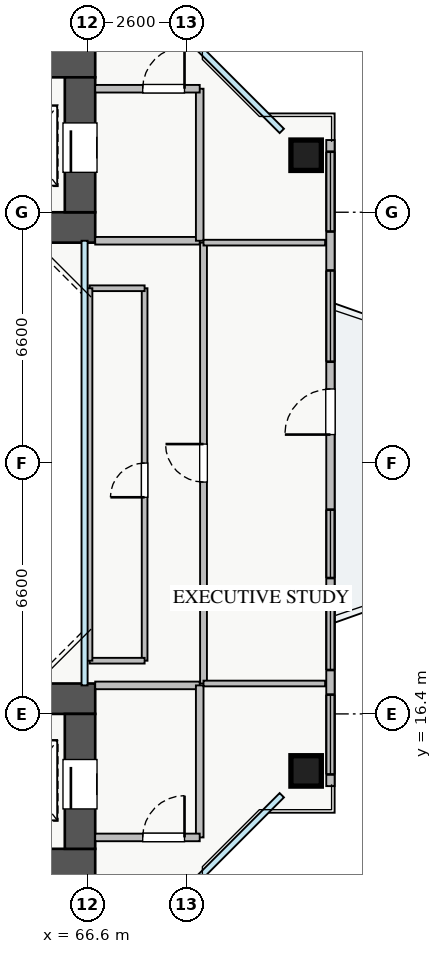
"""IFC4 building model, lengths in metres.
Left out: names, types, materials, properties, quantities, classifications, styles, units other than length and angle.
Written with IfcOpenShell. Run it as: python <this file> out.ifc"""

import sys

from ifc_helpers import new_model, si_unit, direction, frame, frame_2d, origin, origin_2d, place, context, subcontext, project, spatial, rectangle, extrude, source, transform, mapped, element, fill, save


model = new_model("IFC4")
c1 = context("Model", 3, precision=1e-05, world=origin(), true_north=direction((0.0, 1.0)))
c2 = subcontext(c1, "Body", "Model", "MODEL_VIEW")
j1 = project(units=[si_unit("LENGTHUNIT", "METRE"), si_unit("PLANEANGLEUNIT", "RADIAN")], contexts=[c1])
p1 = place(None, origin())
s1 = spatial("IfcSite", under=j1, at=p1, CompositionType="ELEMENT")
p2 = place(p1, origin())
s2 = spatial("IfcBuilding", under=s1, at=p2, CompositionType="ELEMENT")
p3 = place(p2, frame((0.0, 0.0, 76.25)))
s3 = spatial("IfcBuildingStorey", under=s2, at=p3, CompositionType="ELEMENT", Elevation=76.25)
p4 = place(p3, frame((54.2, 29.2, 0.0), z_axis=(0.0, 0.0, 1.0), x_axis=(1.0, 0.0, 0.0)))
e1 = element("IfcWall", 1, at=p4, inside=s3, PredefinedType="SHEAR", context=c2, shape_type="SweptSolid", body=[
    extrude(rectangle(XDim=12.6, YDim=0.8, at=frame_2d((6.3, 0.0))), origin(), (0.0, 0.0, 1.0), 3.25),
])
p5 = place(p3, frame((54.2, 33.55, 0.0), z_axis=(0.0, 0.0, 1.0), x_axis=(1.0, 0.0, 0.0)))
e2 = element("IfcWall", 2, at=p5, inside=s3, PredefinedType="SHEAR", context=c2, shape_type="SweptSolid", body=[
    extrude(rectangle(XDim=12.6, YDim=0.8, at=frame_2d((6.3, 0.0))), origin(), (0.0, 0.0, 1.0), 3.25),
])
p6 = place(p5, frame((8.2, 0.0, 0.0)))
e3 = element("IfcOpeningElement", 3, at=p6, cuts=e2, PredefinedType="OPENING", context=c2, shape_type="SweptSolid", body=[
    extrude(rectangle(XDim=1.1, YDim=2.05, at=frame_2d((0.55, 1.025))), frame((0.0, 0.41, 0.0), z_axis=(0.0, -1.0, 0.0), x_axis=(1.0, 0.0, 0.0)), (0.0, 0.0, 1.0), 0.82),
])
p7 = place(p3, frame((66.4, 29.6, 0.0), z_axis=(0.0, 0.0, 1.0), x_axis=(0.0, 1.0, 0.0)))
e4 = element("IfcWall", 4, at=p7, inside=s3, PredefinedType="SHEAR", context=c2, shape_type="SweptSolid", body=[
    extrude(rectangle(XDim=3.55, YDim=0.8, at=frame_2d((1.775, 0.0))), origin(), (0.0, 0.0, 1.0), 3.25),
])
p8 = place(p7, frame((1.05, 0.0, 0.0)))
e5 = element("IfcOpeningElement", 5, at=p8, cuts=e4, PredefinedType="OPENING", context=c2, shape_type="SweptSolid", body=[
    extrude(rectangle(XDim=1.3, YDim=2.05, at=frame_2d((0.65, 1.025))), frame((0.0, 0.41, 0.0), z_axis=(0.0, -1.0, 0.0), x_axis=(1.0, 0.0, 0.0)), (0.0, 0.0, 1.0), 0.82),
])
p9 = place(p3, frame((54.2, 12.45, 0.0), z_axis=(0.0, 0.0, 1.0), x_axis=(1.0, 0.0, 0.0)))
e6 = element("IfcWall", 6, at=p9, inside=s3, PredefinedType="SHEAR", context=c2, shape_type="SweptSolid", body=[
    extrude(rectangle(XDim=12.6, YDim=0.8, at=frame_2d((6.3, 0.0))), origin(), (0.0, 0.0, 1.0), 3.25),
])
p10 = place(p9, frame((8.2, 0.0, 0.0)))
e7 = element("IfcOpeningElement", 7, at=p10, cuts=e6, PredefinedType="OPENING", context=c2, shape_type="SweptSolid", body=[
    extrude(rectangle(XDim=1.1, YDim=2.05, at=frame_2d((0.55, 1.025))), frame((0.0, 0.41, 0.0), z_axis=(0.0, -1.0, 0.0), x_axis=(1.0, 0.0, 0.0)), (0.0, 0.0, 1.0), 0.82),
])
p11 = place(p3, frame((54.2, 16.8, 0.0), z_axis=(0.0, 0.0, 1.0), x_axis=(1.0, 0.0, 0.0)))
e8 = element("IfcWall", 8, at=p11, inside=s3, PredefinedType="SHEAR", context=c2, shape_type="SweptSolid", body=[
    extrude(rectangle(XDim=12.6, YDim=0.8, at=frame_2d((6.3, 0.0))), origin(), (0.0, 0.0, 1.0), 3.25),
])
p12 = place(p3, frame((66.4, 12.85, 0.0), z_axis=(0.0, 0.0, 1.0), x_axis=(0.0, 1.0, 0.0)))
e9 = element("IfcWall", 9, at=p12, inside=s3, PredefinedType="SHEAR", context=c2, shape_type="SweptSolid", body=[
    extrude(rectangle(XDim=3.55, YDim=0.8, at=frame_2d((1.775, 0.0))), origin(), (0.0, 0.0, 1.0), 3.25),
])
p13 = place(p12, frame((1.05, 0.0, 0.0)))
e10 = element("IfcOpeningElement", 10, at=p13, cuts=e9, PredefinedType="OPENING", context=c2, shape_type="SweptSolid", body=[
    extrude(rectangle(XDim=1.3, YDim=2.05, at=frame_2d((0.65, 1.025))), frame((0.0, 0.41, 0.0), z_axis=(0.0, -1.0, 0.0), x_axis=(1.0, 0.0, 0.0)), (0.0, 0.0, 1.0), 0.82),
])
m1 = source(origin(), c2, "Body", "SweptSolid", [
    extrude(rectangle(XDim=0.8, YDim=0.8, at=origin_2d()), origin(), (0.0, 0.0, 1.0), 3.25),
])
for number, where, z_axis, x_axis in (
    (11, (72.35, 14.9, 0.0), (0.0, 0.0, 1.0), (1.0, 0.0, 0.0)),
    (12, (72.35, 31.1, 0.0), (0.0, 0.0, 1.0), (1.0, 0.0, 0.0)),
):
    element("IfcColumn", number, at=place(p3, frame(where, z_axis=z_axis, x_axis=x_axis)), inside=s3, PredefinedType="COLUMN", context=c2, shape_type="MappedRepresentation", body=[
        mapped(m1, transform((0.0, 0.0, 0.0), x_axis=(1.0, 0.0, 0.0), y_axis=(0.0, 1.0, 0.0), z_axis=(0.0, 0.0, 1.0), scale=1.0)),
    ])
p14 = place(p3, frame((72.99, 14.5, 0.0), z_axis=(0.0, 0.0, 1.0), x_axis=(0.0, 1.0, 0.0)))
e13 = element("IfcWall", 13, at=p14, inside=s3, PredefinedType="STANDARD", context=c2, shape_type="SweptSolid", body=[
    extrude(rectangle(XDim=17.0, YDim=0.22, at=frame_2d((8.5, 0.0))), origin(), (0.0, 0.0, 1.0), 2.61),
])
p15 = place(p14, frame((9.25, 0.0, 0.0)))
e14 = element("IfcOpeningElement", 14, at=p15, cuts=e13, PredefinedType="OPENING", context=c2, shape_type="SweptSolid", body=[
    extrude(rectangle(XDim=1.2, YDim=2.1, at=frame_2d((0.6, 1.05))), frame((0.0, 0.12, 0.0), z_axis=(0.0, -1.0, 0.0), x_axis=(1.0, 0.0, 0.0)), (0.0, 0.0, 1.0), 0.24),
])
p16 = place(p14, frame((0.308, 0.0, 0.9)))
e15 = element("IfcOpeningElement", 15, at=p16, cuts=e13, PredefinedType="OPENING", context=c2, shape_type="SweptSolid", body=[
    extrude(rectangle(XDim=2.1, YDim=1.5, at=frame_2d((1.05, 0.75))), frame((0.0, 0.12, 0.0), z_axis=(0.0, -1.0, 0.0), x_axis=(1.0, 0.0, 0.0)), (0.0, 0.0, 1.0), 0.24),
])
p17 = place(p14, frame((5.475, 0.0, 0.9)))
e16 = element("IfcOpeningElement", 16, at=p17, cuts=e13, PredefinedType="OPENING", context=c2, shape_type="SweptSolid", body=[
    extrude(rectangle(XDim=1.8, YDim=1.45, at=frame_2d((0.9, 0.725))), frame((0.0, 0.12, 0.0), z_axis=(0.0, -1.0, 0.0), x_axis=(1.0, 0.0, 0.0)), (0.0, 0.0, 1.0), 0.24),
])
p18 = place(p14, frame((14.593, 0.0, 0.9)))
e17 = element("IfcOpeningElement", 17, at=p18, cuts=e13, PredefinedType="OPENING", context=c2, shape_type="SweptSolid", body=[
    extrude(rectangle(XDim=2.1, YDim=1.5, at=frame_2d((1.05, 0.75))), frame((0.0, 0.12, 0.0), z_axis=(0.0, -1.0, 0.0), x_axis=(1.0, 0.0, 0.0)), (0.0, 0.0, 1.0), 0.24),
])
p19 = place(p14, frame((3.055, 0.0, 0.9)))
e18 = element("IfcOpeningElement", 18, at=p19, cuts=e13, PredefinedType="OPENING", context=c2, shape_type="SweptSolid", body=[
    extrude(rectangle(XDim=2.1, YDim=1.5, at=frame_2d((1.05, 0.75))), frame((0.0, 0.12, 0.0), z_axis=(0.0, -1.0, 0.0), x_axis=(1.0, 0.0, 0.0)), (0.0, 0.0, 1.0), 0.24),
])
p20 = place(p14, frame((11.167, 0.0, 0.9)))
e19 = element("IfcOpeningElement", 19, at=p20, cuts=e13, PredefinedType="OPENING", context=c2, shape_type="SweptSolid", body=[
    extrude(rectangle(XDim=2.4, YDim=1.5, at=frame_2d((1.2, 0.75))), frame((0.0, 0.12, 0.0), z_axis=(0.0, -1.0, 0.0), x_axis=(1.0, 0.0, 0.0)), (0.0, 0.0, 1.0), 0.24),
])
p21 = place(p3, frame((66.8, 28.85, 0.0), z_axis=(0.0, 0.0, 1.0), x_axis=(1.0, 0.0, 0.0)))
e20 = element("IfcWall", 20, at=p21, inside=s3, PredefinedType="PARTITIONING", context=c2, shape_type="SweptSolid", body=[
    extrude(rectangle(XDim=2.75, YDim=0.2, at=frame_2d((1.375, 0.0))), origin(), (0.0, 0.0, 1.0), 3.07),
])
p22 = place(p3, frame((69.55, 28.85, 0.0), z_axis=(0.0, 0.0, 1.0), x_axis=(0.0, 1.0, 0.0)))
e21 = element("IfcWall", 21, at=p22, inside=s3, PredefinedType="PARTITIONING", context=c2, shape_type="SweptSolid", body=[
    extrude(rectangle(XDim=4.0, YDim=0.2, at=frame_2d((2.0, 0.0))), origin(), (0.0, 0.0, 1.0), 3.07),
])
p23 = place(p3, frame((66.8, 32.85, 0.0), z_axis=(0.0, 0.0, 1.0), x_axis=(1.0, 0.0, 0.0)))
e22 = element("IfcWall", 22, at=p23, inside=s3, PredefinedType="PARTITIONING", context=c2, shape_type="SweptSolid", body=[
    extrude(rectangle(XDim=2.75, YDim=0.2, at=frame_2d((1.375, 0.0))), origin(), (0.0, 0.0, 1.0), 3.07),
])
p24 = place(p23, frame((1.25, 0.0, 0.0)))
e23 = element("IfcOpeningElement", 23, at=p24, cuts=e22, PredefinedType="OPENING", context=c2, shape_type="SweptSolid", body=[
    extrude(rectangle(XDim=1.1, YDim=2.05, at=frame_2d((0.55, 1.025))), frame((0.0, 0.11, 0.0), z_axis=(0.0, -1.0, 0.0), x_axis=(1.0, 0.0, 0.0)), (0.0, 0.0, 1.0), 0.22),
])
p25 = place(p3, frame((66.8, 17.15, 0.0), z_axis=(0.0, 0.0, 1.0), x_axis=(1.0, 0.0, 0.0)))
e24 = element("IfcWall", 24, at=p25, inside=s3, PredefinedType="PARTITIONING", context=c2, shape_type="SweptSolid", body=[
    extrude(rectangle(XDim=2.75, YDim=0.2, at=frame_2d((1.375, 0.0))), origin(), (0.0, 0.0, 1.0), 3.07),
])
p26 = place(p3, frame((69.55, 13.15, 0.0), z_axis=(0.0, 0.0, 1.0), x_axis=(0.0, 1.0, 0.0)))
e25 = element("IfcWall", 25, at=p26, inside=s3, PredefinedType="PARTITIONING", context=c2, shape_type="SweptSolid", body=[
    extrude(rectangle(XDim=4.0, YDim=0.2, at=frame_2d((2.0, 0.0))), origin(), (0.0, 0.0, 1.0), 3.07),
])
p27 = place(p3, frame((66.8, 13.15, 0.0), z_axis=(0.0, 0.0, 1.0), x_axis=(1.0, 0.0, 0.0)))
e26 = element("IfcWall", 26, at=p27, inside=s3, PredefinedType="PARTITIONING", context=c2, shape_type="SweptSolid", body=[
    extrude(rectangle(XDim=2.75, YDim=0.2, at=frame_2d((1.375, 0.0))), origin(), (0.0, 0.0, 1.0), 3.07),
])
p28 = place(p27, frame((1.25, 0.0, 0.0)))
e27 = element("IfcOpeningElement", 27, at=p28, cuts=e26, PredefinedType="OPENING", context=c2, shape_type="SweptSolid", body=[
    extrude(rectangle(XDim=1.1, YDim=2.05, at=frame_2d((0.55, 1.025))), frame((0.0, 0.11, 0.0), z_axis=(0.0, -1.0, 0.0), x_axis=(1.0, 0.0, 0.0)), (0.0, 0.0, 1.0), 0.22),
])
p29 = place(p3, frame((69.65, 17.2, 0.0), z_axis=(0.0, 0.0, 1.0), x_axis=(0.0, 1.0, 0.0)))
e28 = element("IfcWall", 28, at=p29, inside=s3, PredefinedType="PARTITIONING", context=c2, shape_type="SweptSolid", body=[
    extrude(rectangle(XDim=11.6, YDim=0.18, at=frame_2d((5.8, 0.0))), origin(), (0.0, 0.0, 1.0), 3.07),
])
p30 = place(p29, frame((5.3, 0.0, 0.0)))
e29 = element("IfcOpeningElement", 29, at=p30, cuts=e28, PredefinedType="OPENING", context=c2, shape_type="SweptSolid", body=[
    extrude(rectangle(XDim=1.0, YDim=2.05, at=frame_2d((0.5, 1.025))), frame((0.0, 0.1, 0.0), z_axis=(0.0, -1.0, 0.0), x_axis=(1.0, 0.0, 0.0)), (0.0, 0.0, 1.0), 0.2),
])
for number, where, z_axis, x_axis in (
    (30, (69.65, 17.2, 0.0), (0.0, 0.0, 1.0), (1.0, 0.0, 0.0)),
    (31, (69.65, 28.8, 0.0), (0.0, 0.0, 1.0), (1.0, 0.0, 0.0)),
):
    element("IfcWall", number, at=place(p3, frame(where, z_axis=z_axis, x_axis=x_axis)), inside=s3, PredefinedType="PARTITIONING", context=c2, shape_type="SweptSolid", body=[
        extrude(rectangle(XDim=3.2, YDim=0.15, at=frame_2d((1.6, 0.0))), origin(), (0.0, 0.0, 1.0), 3.07),
    ])
p31 = place(p3, frame((68.1, 17.8, 0.0), z_axis=(0.0, 0.0, 1.0), x_axis=(0.0, 1.0, 0.0)))
e32 = element("IfcWall", 32, at=p31, inside=s3, PredefinedType="PARTITIONING", context=c2, shape_type="SweptSolid", body=[
    extrude(rectangle(XDim=9.8, YDim=0.15, at=frame_2d((4.9, 0.0))), origin(), (0.0, 0.0, 1.0), 3.07),
])
p32 = place(p31, frame((4.3, 0.0, 0.0)))
e33 = element("IfcOpeningElement", 33, at=p32, cuts=e32, PredefinedType="OPENING", context=c2, shape_type="SweptSolid", body=[
    extrude(rectangle(XDim=0.9, YDim=2.05, at=frame_2d((0.45, 1.025))), frame((0.0, 0.085, 0.0), z_axis=(0.0, -1.0, 0.0), x_axis=(1.0, 0.0, 0.0)), (0.0, 0.0, 1.0), 0.17),
])
p33 = place(p3, frame((66.65, 27.6, 0.0), z_axis=(0.0, 0.0, 1.0), x_axis=(1.0, 0.0, 0.0)))
e34 = element("IfcWall", 34, at=p33, inside=s3, PredefinedType="PARTITIONING", context=c2, shape_type="SweptSolid", body=[
    extrude(rectangle(XDim=1.45, YDim=0.15, at=frame_2d((0.725, 0.0))), origin(), (0.0, 0.0, 1.0), 2.715),
])
p34 = place(p3, frame((66.65, 17.8, 0.0), z_axis=(0.0, 0.0, 1.0), x_axis=(1.0, 0.0, 0.0)))
e35 = element("IfcWall", 35, at=p34, inside=s3, PredefinedType="PARTITIONING", context=c2, shape_type="SweptSolid", body=[
    extrude(rectangle(XDim=1.45, YDim=0.15, at=frame_2d((0.725, 0.0))), origin(), (0.0, 0.0, 1.0), 3.07),
])
p35 = place(p3, frame((66.65, 17.8, 0.0), z_axis=(0.0, 0.0, 1.0), x_axis=(0.0, 1.0, 0.0)))
e36 = element("IfcWall", 36, at=p35, inside=s3, PredefinedType="PARTITIONING", context=c2, shape_type="SweptSolid", body=[
    extrude(rectangle(XDim=9.8, YDim=0.15, at=frame_2d((4.9, 0.0))), origin(), (0.0, 0.0, 1.0), 2.665),
])
m2 = source(origin(), c2, "Body", "SweptSolid", [
    extrude(rectangle(XDim=1.2, YDim=2.1, at=frame_2d((0.6, 1.05))), frame((0.0, 0.025, 0.0), z_axis=(0.0, -1.0, 0.0), x_axis=(1.0, 0.0, 0.0)), (0.0, 0.0, 1.0), 0.05),
])
p36 = place(p15, origin())
e37 = element("IfcDoor", 37, at=p36, inside=s3, OperationType="SINGLE_SWING_LEFT", PredefinedType="DOOR", context=c2, shape_type="MappedRepresentation", body=[
    mapped(m2, transform((0.0, 0.0, 0.0), x_axis=(1.0, 0.0, 0.0), y_axis=(0.0, 1.0, 0.0), z_axis=(0.0, 0.0, 1.0), scale=1.0)),
])
fill(e14, e37)
m3 = source(origin(), c2, "Body", "SweptSolid", [
    extrude(rectangle(XDim=2.1, YDim=1.5, at=frame_2d((1.05, 0.75))), frame((0.0, 0.03, 0.0), z_axis=(0.0, -1.0, 0.0), x_axis=(1.0, 0.0, 0.0)), (0.0, 0.0, 1.0), 0.06),
])
p37 = place(p16, origin())
e38 = element("IfcWindow", 38, at=p37, inside=s3, PartitioningType="TRIPLE_PANEL_VERTICAL", PredefinedType="WINDOW", context=c2, shape_type="MappedRepresentation", body=[
    mapped(m3, transform((0.0, 0.0, 0.0), x_axis=(1.0, 0.0, 0.0), y_axis=(0.0, 1.0, 0.0), z_axis=(0.0, 0.0, 1.0), scale=1.0)),
])
fill(e15, e38)
m4 = source(origin(), c2, "Body", "SweptSolid", [
    extrude(rectangle(XDim=1.8, YDim=1.45, at=frame_2d((0.9, 0.725))), frame((0.0, 0.03, 0.0), z_axis=(0.0, -1.0, 0.0), x_axis=(1.0, 0.0, 0.0)), (0.0, 0.0, 1.0), 0.06),
])
p38 = place(p17, origin())
e39 = element("IfcWindow", 39, at=p38, inside=s3, PartitioningType="DOUBLE_PANEL_VERTICAL", PredefinedType="WINDOW", context=c2, shape_type="MappedRepresentation", body=[
    mapped(m4, transform((0.0, 0.0, 0.0), x_axis=(1.0, 0.0, 0.0), y_axis=(0.0, 1.0, 0.0), z_axis=(0.0, 0.0, 1.0), scale=1.0)),
])
fill(e16, e39)
p39 = place(p18, origin())
e40 = element("IfcWindow", 40, at=p39, inside=s3, PartitioningType="TRIPLE_PANEL_VERTICAL", PredefinedType="WINDOW", context=c2, shape_type="MappedRepresentation", body=[
    mapped(m3, transform((0.0, 0.0, 0.0), x_axis=(1.0, 0.0, 0.0), y_axis=(0.0, 1.0, 0.0), z_axis=(0.0, 0.0, 1.0), scale=1.0)),
])
fill(e17, e40)
m5 = source(origin(), c2, "Body", "SweptSolid", [
    extrude(rectangle(XDim=1.3, YDim=2.05, at=frame_2d((0.65, 1.025))), frame((0.0, 0.025, 0.0), z_axis=(0.0, -1.0, 0.0), x_axis=(1.0, 0.0, 0.0)), (0.0, 0.0, 1.0), 0.05),
])
p40 = place(p8, origin())
e41 = element("IfcDoor", 41, at=p40, inside=s3, OperationType="SLIDING_TO_LEFT", PredefinedType="DOOR", context=c2, shape_type="MappedRepresentation", body=[
    mapped(m5, transform((0.0, 0.0, 0.0), x_axis=(1.0, 0.0, 0.0), y_axis=(0.0, 1.0, 0.0), z_axis=(0.0, 0.0, 1.0), scale=1.0)),
])
fill(e5, e41)
p41 = place(p13, origin())
e42 = element("IfcDoor", 42, at=p41, inside=s3, OperationType="SLIDING_TO_RIGHT", PredefinedType="DOOR", context=c2, shape_type="MappedRepresentation", body=[
    mapped(m5, transform((0.0, 0.0, 0.0), x_axis=(1.0, 0.0, 0.0), y_axis=(0.0, 1.0, 0.0), z_axis=(0.0, 0.0, 1.0), scale=1.0)),
])
fill(e10, e42)
m6 = source(origin(), c2, "Body", "SweptSolid", [
    extrude(rectangle(XDim=1.1, YDim=2.05, at=frame_2d((0.55, 1.025))), frame((0.0, 0.025, 0.0), z_axis=(0.0, -1.0, 0.0), x_axis=(1.0, 0.0, 0.0)), (0.0, 0.0, 1.0), 0.05),
])
p42 = place(p24, origin())
e43 = element("IfcDoor", 43, at=p42, inside=s3, OperationType="SINGLE_SWING_RIGHT", PredefinedType="DOOR", context=c2, shape_type="MappedRepresentation", body=[
    mapped(m6, transform((0.0, 0.0, 0.0), x_axis=(1.0, 0.0, 0.0), y_axis=(0.0, 1.0, 0.0), z_axis=(0.0, 0.0, 1.0), scale=1.0)),
])
fill(e23, e43)
p43 = place(p28, origin())
e44 = element("IfcDoor", 44, at=p43, inside=s3, OperationType="SINGLE_SWING_RIGHT", PredefinedType="DOOR", context=c2, shape_type="MappedRepresentation", body=[
    mapped(m6, transform((0.0, 0.0, 0.0), x_axis=(1.0, 0.0, 0.0), y_axis=(0.0, 1.0, 0.0), z_axis=(0.0, 0.0, 1.0), scale=1.0)),
])
fill(e27, e44)
m7 = source(origin(), c2, "Body", "SweptSolid", [
    extrude(rectangle(XDim=1.0, YDim=2.05, at=frame_2d((0.5, 1.025))), frame((0.0, 0.025, 0.0), z_axis=(0.0, -1.0, 0.0), x_axis=(1.0, 0.0, 0.0)), (0.0, 0.0, 1.0), 0.05),
])
p44 = place(p30, origin())
e45 = element("IfcDoor", 45, at=p44, inside=s3, OperationType="SINGLE_SWING_RIGHT", PredefinedType="DOOR", context=c2, shape_type="MappedRepresentation", body=[
    mapped(m7, transform((0.0, 0.0, 0.0), x_axis=(1.0, 0.0, 0.0), y_axis=(0.0, 1.0, 0.0), z_axis=(0.0, 0.0, 1.0), scale=1.0)),
])
fill(e29, e45)
m8 = source(origin(), c2, "Body", "SweptSolid", [
    extrude(rectangle(XDim=0.9, YDim=2.05, at=frame_2d((0.45, 1.025))), frame((0.0, 0.025, 0.0), z_axis=(0.0, -1.0, 0.0), x_axis=(1.0, 0.0, 0.0)), (0.0, 0.0, 1.0), 0.05),
])
p45 = place(p32, origin())
e46 = element("IfcDoor", 46, at=p45, inside=s3, OperationType="SINGLE_SWING_LEFT", PredefinedType="DOOR", context=c2, shape_type="MappedRepresentation", body=[
    mapped(m8, transform((0.0, 0.0, 0.0), x_axis=(1.0, 0.0, 0.0), y_axis=(0.0, 1.0, 0.0), z_axis=(0.0, 0.0, 1.0), scale=1.0)),
])
fill(e33, e46)
p46 = place(p19, origin())
e47 = element("IfcWindow", 47, at=p46, inside=s3, PartitioningType="TRIPLE_PANEL_VERTICAL", PredefinedType="WINDOW", context=c2, shape_type="MappedRepresentation", body=[
    mapped(m3, transform((0.0, 0.0, 0.0), x_axis=(1.0, 0.0, 0.0), y_axis=(0.0, 1.0, 0.0), z_axis=(0.0, 0.0, 1.0), scale=1.0)),
])
fill(e18, e47)
m9 = source(origin(), c2, "Body", "SweptSolid", [
    extrude(rectangle(XDim=2.4, YDim=1.5, at=frame_2d((1.2, 0.75))), frame((0.0, 0.03, 0.0), z_axis=(0.0, -1.0, 0.0), x_axis=(1.0, 0.0, 0.0)), (0.0, 0.0, 1.0), 0.06),
])
p47 = place(p20, origin())
e48 = element("IfcWindow", 48, at=p47, inside=s3, PartitioningType="TRIPLE_PANEL_VERTICAL", PredefinedType="WINDOW", context=c2, shape_type="MappedRepresentation", body=[
    mapped(m9, transform((0.0, 0.0, 0.0), x_axis=(1.0, 0.0, 0.0), y_axis=(0.0, 1.0, 0.0), z_axis=(0.0, 0.0, 1.0), scale=1.0)),
])
fill(e19, e48)
save(model, sys.argv[1])
